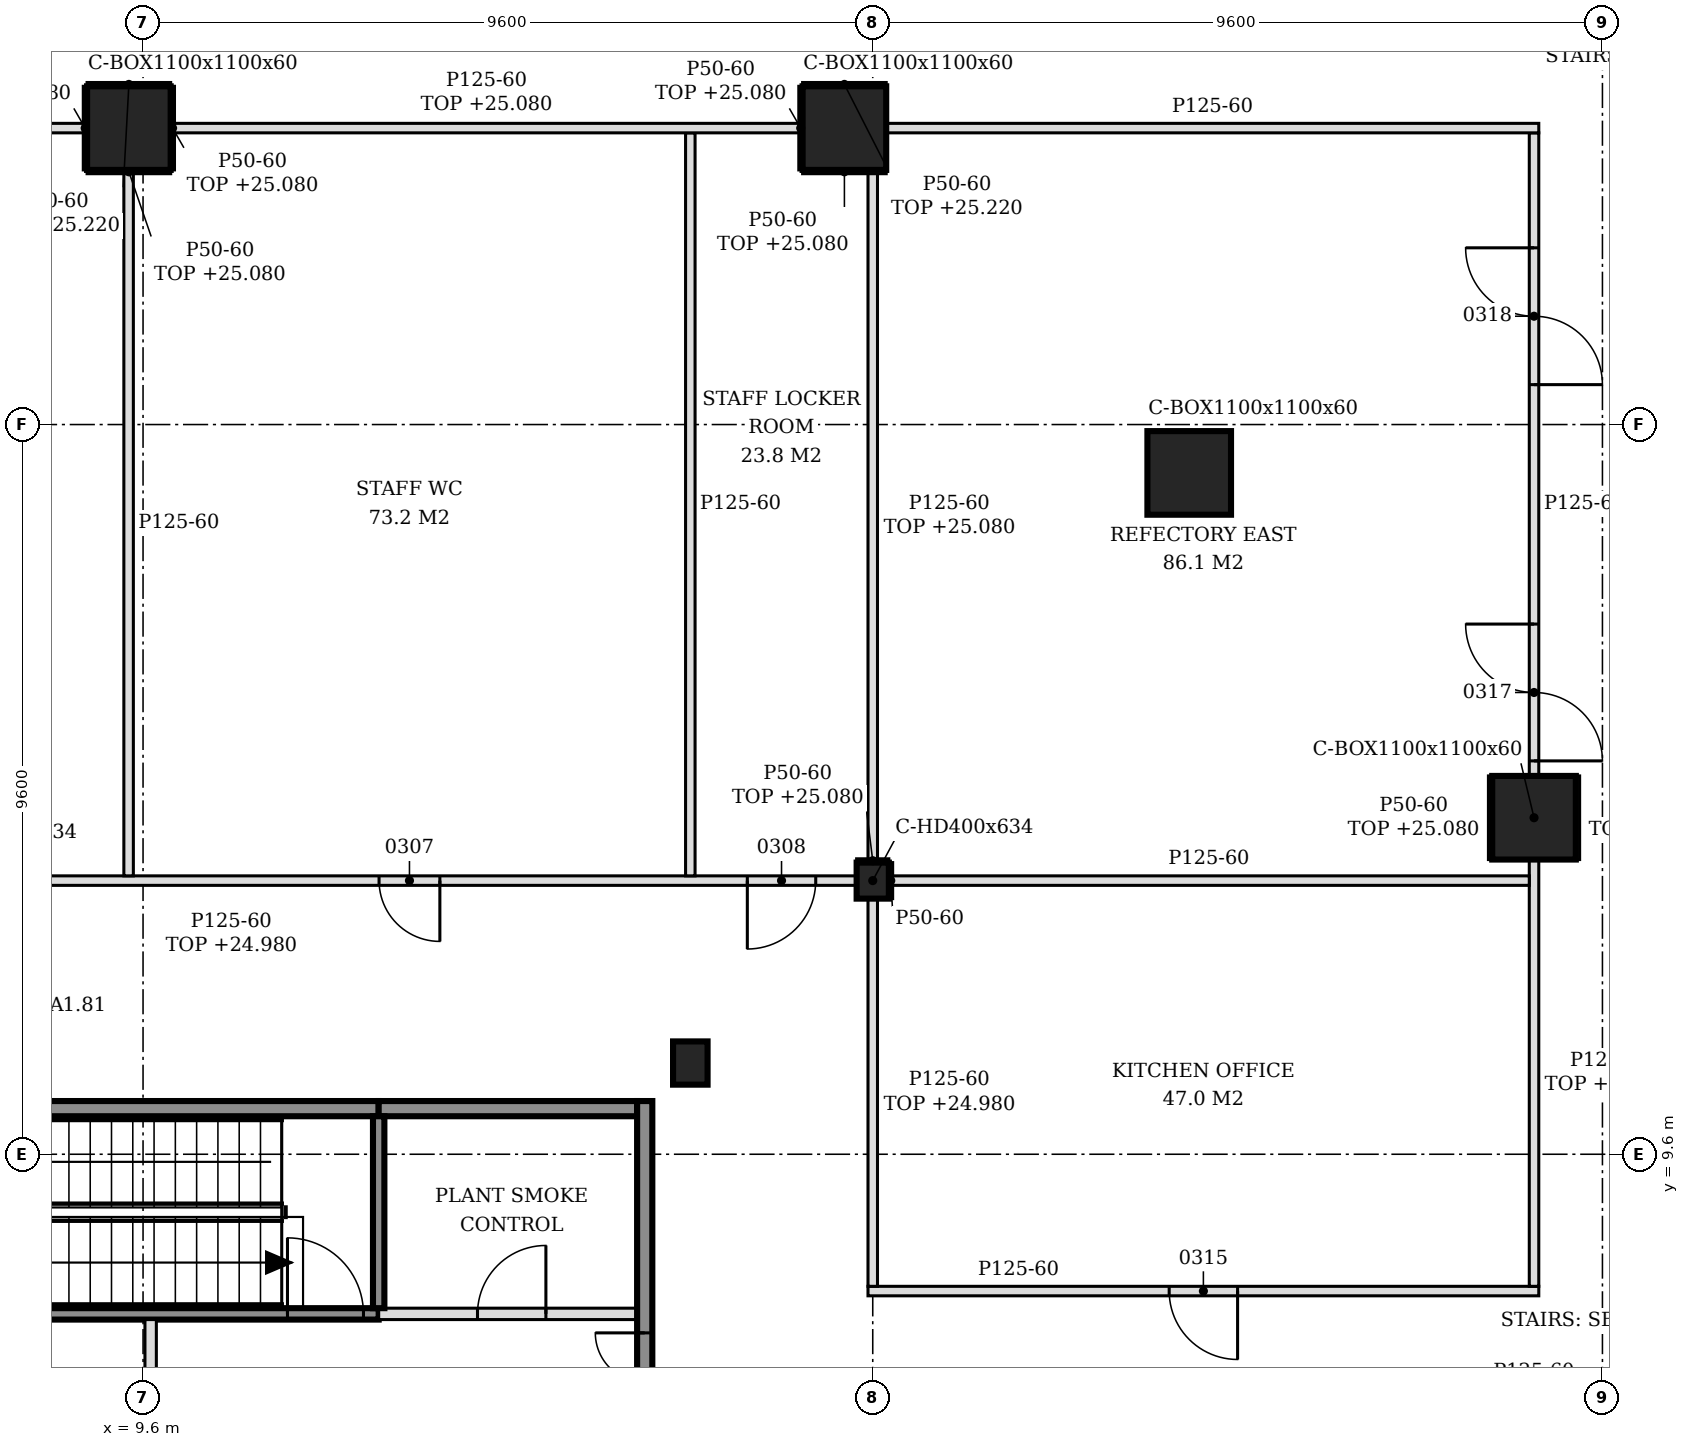
"""IFC4 building model, lengths in metres.
Left out: names, types, materials, properties, quantities, classifications, styles, units other than length and angle.
Written with IfcOpenShell. Run it as: python <this file> out.ifc"""

import sys

from ifc_helpers import new_model, si_unit, direction, frame, frame_2d, origin, origin_2d, place, context, subcontext, project, spatial, polyline, rectangle, hollow_rectangle, i_section, outline, extrude, element, fill, save


model = new_model("IFC4")
c1 = context("Model", 3, precision=1e-05, world=origin(), true_north=direction((0.0, 1.0)))
c2 = subcontext(c1, "Body", "Model", "MODEL_VIEW")
j1 = project(units=[si_unit("LENGTHUNIT", "METRE"), si_unit("PLANEANGLEUNIT", "RADIAN")], contexts=[c1])
p1 = place(None, origin())
s1 = spatial("IfcSite", under=j1, at=p1, CompositionType="ELEMENT")
p2 = place(p1, origin())
s2 = spatial("IfcBuilding", under=s1, at=p2, CompositionType="ELEMENT")
p3 = place(p2, frame((0.0, 0.0, 21.0)))
s3 = spatial("IfcBuildingStorey", under=s2, at=p3, CompositionType="ELEMENT", Elevation=21.0)
for number, where, z_axis, x_axis in (
    (1, (27.9, 14.027, -0.2), (0.0, 0.0, 1.0), (1.0, 0.0, 0.0)),
    (2, (23.364, 18.564, -0.2), (0.0, 0.0, 1.0), (1.0, 0.0, 0.0)),
    (3, (18.827, 23.1, -0.2), (0.0, 0.0, 1.0), (1.0, 0.0, 0.0)),
    (4, (9.414, 23.1, -0.2), (0.0, 0.0, 1.0), (1.0, 0.0, 0.0)),
):
    element("IfcColumn", number, at=place(p3, frame(where, z_axis=z_axis, x_axis=x_axis)), inside=s3, PredefinedType="COLUMN", context=c2, shape_type="SweptSolid", body=[
        extrude(hollow_rectangle(XDim=1.1, YDim=1.1, WallThickness=0.06, at=origin_2d()), origin(), (0.0, 0.0, 1.0), 4.8),
    ])
p4 = place(p3, frame((19.2, 13.2, -0.2), z_axis=(0.0, 0.0, 1.0), x_axis=(1.0, 0.0, 0.0)))
e5 = element("IfcColumn", 5, at=p4, inside=s3, PredefinedType="COLUMN", context=c2, shape_type="SweptSolid", body=[
    extrude(i_section(OverallWidth=0.424, OverallDepth=0.474, WebThickness=0.048, FlangeThickness=0.077, FilletRadius=0.015, at=origin_2d()), origin(), (0.0, 0.0, 1.0), 4.8),
])
p5 = place(p3, frame((16.8, 10.8, -0.2), z_axis=(0.0, 0.0, 1.0), x_axis=(1.0, 0.0, 0.0)))
e6 = element("IfcColumn", 6, at=p5, inside=s3, PredefinedType="COLUMN", context=c2, shape_type="SweptSolid", body=[
    extrude(i_section(OverallWidth=0.454, OverallDepth=0.569, WebThickness=0.078, FlangeThickness=0.125, FilletRadius=0.015, at=origin_2d()), origin(), (0.0, 0.0, 1.0), 4.8),
])
p6 = place(p3, frame((6.275, 7.5, 0.0), z_axis=(0.0, 0.0, 1.0), x_axis=(1.0, 0.0, 0.0)))
e7 = element("IfcWall", 7, at=p6, inside=s3, PredefinedType="SOLIDWALL", context=c2, shape_type="SweptSolid", body=[
    extrude(rectangle(XDim=6.425, YDim=0.15, at=frame_2d((3.212, 0.0))), origin(), (0.0, 0.0, 1.0), 4.6),
])
p7 = place(p6, frame((5.225, 0.0, 0.0)))
e8 = element("IfcOpeningElement", 8, at=p7, cuts=e7, PredefinedType="OPENING", context=c2, shape_type="SweptSolid", body=[
    extrude(rectangle(XDim=1.0, YDim=2.1, at=frame_2d((0.5, 1.05))), frame((0.0, 0.085, 0.0), z_axis=(0.0, -1.0, 0.0), x_axis=(1.0, 0.0, 0.0)), (0.0, 0.0, 1.0), 0.17),
])
p8 = place(p3, frame((12.7, 7.5, 0.0), z_axis=(0.0, 0.0, 1.0), x_axis=(1.0, 0.0, 0.0)))
e9 = element("IfcWall", 9, at=p8, inside=s3, PredefinedType="SOLIDWALL", context=c2, shape_type="SweptSolid", body=[
    extrude(rectangle(XDim=3.4, YDim=0.15, at=frame_2d((1.7, 0.0))), origin(), (0.0, 0.0, 1.0), 4.6),
])
p9 = place(p8, frame((1.3, 0.0, 0.0)))
e10 = element("IfcOpeningElement", 10, at=p9, cuts=e9, PredefinedType="OPENING", context=c2, shape_type="SweptSolid", body=[
    extrude(rectangle(XDim=0.9, YDim=2.1, at=frame_2d((0.45, 1.05))), frame((0.0, 0.085, 0.0), z_axis=(0.0, -1.0, 0.0), x_axis=(1.0, 0.0, 0.0)), (0.0, 0.0, 1.0), 0.17),
])
p10 = place(p3, frame((6.2, 10.2, 0.0), z_axis=(0.0, 0.0, 1.0), x_axis=(1.0, 0.0, 0.0)))
e11 = element("IfcWall", 11, at=p10, inside=s3, PredefinedType="SOLIDWALL", context=c2, shape_type="SweptSolid", body=[
    extrude(rectangle(XDim=6.5, YDim=0.2, at=frame_2d((3.25, 0.0))), origin(), (0.0, 0.0, 1.0), 4.6),
])
p11 = place(p3, frame((12.7, 10.2, 0.0), z_axis=(0.0, 0.0, 1.0), x_axis=(1.0, 0.0, 0.0)))
e12 = element("IfcWall", 12, at=p11, inside=s3, PredefinedType="SOLIDWALL", context=c2, shape_type="SweptSolid", body=[
    extrude(rectangle(XDim=3.4, YDim=0.2, at=frame_2d((1.7, 0.0))), origin(), (0.0, 0.0, 1.0), 4.6),
])
p12 = place(p3, frame((9.7, 4.975, 0.0), z_axis=(0.0, 0.0, 1.0), x_axis=(0.0, 1.0, 0.0)))
e13 = element("IfcWall", 13, at=p12, inside=s3, PredefinedType="SOLIDWALL", context=c2, shape_type="SweptSolid", body=[
    extrude(rectangle(XDim=2.45, YDim=0.15, at=frame_2d((1.225, 0.0))), origin(), (0.0, 0.0, 1.0), 4.6),
])
p13 = place(p3, frame((12.7, 7.575, 0.0), z_axis=(0.0, 0.0, 1.0), x_axis=(0.0, 1.0, 0.0)))
e14 = element("IfcWall", 14, at=p13, inside=s3, PredefinedType="SOLIDWALL", context=c2, shape_type="SweptSolid", body=[
    extrude(rectangle(XDim=2.525, YDim=0.15, at=frame_2d((1.263, 0.0))), origin(), (0.0, 0.0, 1.0), 4.6),
])
p14 = place(p3, frame((16.2, -5.5, 0.0), z_axis=(0.0, 0.0, 1.0), x_axis=(0.0, 1.0, 0.0)))
e15 = element("IfcWall", 15, at=p14, inside=s3, PredefinedType="SOLIDWALL", context=c2, shape_type="SweptSolid", body=[
    extrude(rectangle(XDim=15.8, YDim=0.2, at=frame_2d((7.9, 0.0))), origin(), (0.0, 0.0, 1.0), 4.6),
])
p15 = place(p14, frame((3.05, 0.0, 0.0)))
e16 = element("IfcOpeningElement", 16, at=p15, cuts=e15, PredefinedType="OPENING", context=c2, shape_type="SweptSolid", body=[
    extrude(rectangle(XDim=1.3, YDim=2.1, at=frame_2d((0.65, 1.05))), frame((0.0, 0.11, 0.0), z_axis=(0.0, -1.0, 0.0), x_axis=(1.0, 0.0, 0.0)), (0.0, 0.0, 1.0), 0.22),
])
p16 = place(p14, frame((11.45, 0.0, 0.0)))
e17 = element("IfcOpeningElement", 17, at=p16, cuts=e15, PredefinedType="OPENING", context=c2, shape_type="SweptSolid", body=[
    extrude(rectangle(XDim=1.3, YDim=2.1, at=frame_2d((0.65, 1.05))), frame((0.0, 0.11, 0.0), z_axis=(0.0, -1.0, 0.0), x_axis=(1.0, 0.0, 0.0)), (0.0, 0.0, 1.0), 0.22),
])
p17 = place(p3, frame((19.137, 7.8, 0.0), z_axis=(0.0, 0.0, 1.0), x_axis=(1.0, 0.0, 0.0)))
e18 = element("IfcWall", 18, at=p17, inside=s3, PredefinedType="PARTITIONING", context=c2, shape_type="SweptSolid", body=[
    extrude(outline(polyline([(0.0, 0.0), (8.825, 0.0), (8.825, 4.08), (8.613, 4.08), (8.611, 4.6), (4.962, 4.6), (4.96, 4.08), (4.762, 4.08), (4.76, 4.6), (0.212, 4.6), (0.21, 3.98), (0.0, 3.98), (0.0, 0.0)])), frame((0.0, 0.062, 0.0), z_axis=(0.0, -1.0, 0.0), x_axis=(1.0, 0.0, 0.0)), (0.0, 0.0, 1.0), 0.125),
])
p18 = place(p17, frame((3.962, 0.0, 0.0)))
e19 = element("IfcOpeningElement", 19, at=p18, cuts=e18, PredefinedType="OPENING", context=c2, shape_type="SweptSolid", body=[
    extrude(rectangle(XDim=0.9, YDim=2.1, at=frame_2d((0.45, 1.05))), frame((0.0, 0.073, 0.0), z_axis=(0.0, -1.0, 0.0), x_axis=(1.0, 0.0, 0.0)), (0.0, 0.0, 1.0), 0.145),
])
p19 = place(p3, frame((19.2, 7.863, 0.0), z_axis=(0.0, 0.0, 1.0), x_axis=(0.0, 1.0, 0.0)))
e20 = element("IfcWall", 20, at=p19, inside=s3, PredefinedType="PARTITIONING", context=c2, shape_type="SweptSolid", body=[
    extrude(rectangle(XDim=5.1, YDim=0.125, at=frame_2d((2.55, 0.0))), origin(), (0.0, 0.0, 1.0), 3.98),
])
p20 = place(p3, frame((27.9, 7.863, 0.0), z_axis=(0.0, 0.0, 1.0), x_axis=(0.0, 1.0, 0.0)))
e21 = element("IfcWall", 21, at=p20, inside=s3, PredefinedType="PARTITIONING", context=c2, shape_type="SweptSolid", body=[
    extrude(rectangle(XDim=5.615, YDim=0.125, at=frame_2d((2.807, 0.0))), origin(), (0.0, 0.0, 1.0), 4.08),
])
p21 = place(p3, frame((7.412, 13.2, 0.0), z_axis=(0.0, 0.0, 1.0), x_axis=(1.0, 0.0, 0.0)))
e22 = element("IfcWall", 22, at=p21, inside=s3, PredefinedType="PARTITIONING", context=c2, shape_type="SweptSolid", body=[
    extrude(rectangle(XDim=11.576, YDim=0.125, at=frame_2d((5.788, 0.0))), origin(), (0.0, 0.0, 1.0), 3.98),
])
p22 = place(p21, frame((5.293, 0.0, 0.0)))
e23 = element("IfcOpeningElement", 23, at=p22, cuts=e22, PredefinedType="OPENING", context=c2, shape_type="SweptSolid", body=[
    extrude(rectangle(XDim=0.8, YDim=2.1, at=frame_2d((0.4, 1.05))), frame((0.0, 0.073, 0.0), z_axis=(0.0, -1.0, 0.0), x_axis=(1.0, 0.0, 0.0)), (0.0, 0.0, 1.0), 0.145),
])
p23 = place(p21, frame((10.138, 0.0, 0.0)))
e24 = element("IfcOpeningElement", 24, at=p23, cuts=e22, PredefinedType="OPENING", context=c2, shape_type="SweptSolid", body=[
    extrude(rectangle(XDim=0.9, YDim=2.1, at=frame_2d((0.45, 1.05))), frame((0.0, 0.073, 0.0), z_axis=(0.0, -1.0, 0.0), x_axis=(1.0, 0.0, 0.0)), (0.0, 0.0, 1.0), 0.145),
])
p24 = place(p3, frame((19.412, 13.2, 0.0), z_axis=(0.0, 0.0, 1.0), x_axis=(1.0, 0.0, 0.0)))
e25 = element("IfcWall", 25, at=p24, inside=s3, PredefinedType="PARTITIONING", context=c2, shape_type="SweptSolid", body=[
    extrude(outline(polyline([(0.0, 0.0), (8.425, 0.0), (8.426, 4.08), (8.338, 4.08), (8.336, 4.6), (4.678, 4.6), (4.676, 4.18), (4.498, 4.18), (4.496, 4.6), (0.0, 4.6), (0.0, 0.0)])), frame((0.0, 0.062, 0.0), z_axis=(0.0, -1.0, 0.0), x_axis=(1.0, 0.0, 0.0)), (0.0, 0.0, 1.0), 0.125),
])
p25 = place(p3, frame((9.41, 13.262, 0.0), z_axis=(0.0, 0.0, 1.0), x_axis=(0.0, 1.0, 0.0)))
e26 = element("IfcWall", 26, at=p25, inside=s3, PredefinedType="PARTITIONING", context=c2, shape_type="SweptSolid", body=[
    extrude(outline(polyline([(0.0, 0.0), (9.288, 0.0), (9.288, 4.6), (0.087, 4.6), (0.085, 3.98), (0.0, 3.98), (0.0, 0.0)])), frame((0.0, 0.062, 0.0), z_axis=(0.0, -1.0, 0.0), x_axis=(1.0, 0.0, 0.0)), (0.0, 0.0, 1.0), 0.125),
])
p26 = place(p3, frame((16.8, 13.262, 0.0), z_axis=(0.0, 0.0, 1.0), x_axis=(0.0, 1.0, 0.0)))
e27 = element("IfcWall", 27, at=p26, inside=s3, PredefinedType="PARTITIONING", context=c2, shape_type="SweptSolid", body=[
    extrude(outline(polyline([(0.0, 0.0), (9.775, 0.0), (9.775, 4.08), (9.688, 4.08), (9.686, 4.6), (0.087, 4.6), (0.085, 3.98), (0.0, 3.98), (0.0, 0.0)])), frame((0.0, 0.062, 0.0), z_axis=(0.0, -1.0, 0.0), x_axis=(1.0, 0.0, 0.0)), (0.0, 0.0, 1.0), 0.125),
])
p27 = place(p3, frame((19.2, 13.437, 0.0), z_axis=(0.0, 0.0, 1.0), x_axis=(0.0, 1.0, 0.0)))
e28 = element("IfcWall", 28, at=p27, inside=s3, PredefinedType="PARTITIONING", context=c2, shape_type="SweptSolid", body=[
    extrude(rectangle(XDim=9.113, YDim=0.125, at=frame_2d((4.557, 0.0))), origin(), (0.0, 0.0, 1.0), 4.08),
])
p28 = place(p3, frame((27.9, 14.577, 0.0), z_axis=(0.0, 0.0, 1.0), x_axis=(0.0, 1.0, 0.0)))
e29 = element("IfcWall", 29, at=p28, inside=s3, PredefinedType="PARTITIONING", context=c2, shape_type="SweptSolid", body=[
    extrude(outline(polyline([(0.0, 0.0), (8.46, 0.0), (8.46, 4.6), (4.713, 4.6), (4.711, 4.18), (4.533, 4.18), (4.531, 4.6), (0.0, 4.6), (0.0, 0.0)])), frame((0.0, 0.062, 0.0), z_axis=(0.0, -1.0, 0.0), x_axis=(1.0, 0.0, 0.0)), (0.0, 0.0, 1.0), 0.125),
])
p29 = place(p28, frame((0.198, 0.0, 0.0)))
e30 = element("IfcOpeningElement", 30, at=p29, cuts=e29, PredefinedType="OPENING", context=c2, shape_type="SweptSolid", body=[
    extrude(rectangle(XDim=1.8, YDim=2.1, at=frame_2d((0.9, 1.05))), frame((0.0, 0.073, 0.0), z_axis=(0.0, -1.0, 0.0), x_axis=(1.0, 0.0, 0.0)), (0.0, 0.0, 1.0), 0.145),
])
p30 = place(p28, frame((5.148, 0.0, 0.0)))
e31 = element("IfcOpeningElement", 31, at=p30, cuts=e29, PredefinedType="OPENING", context=c2, shape_type="SweptSolid", body=[
    extrude(rectangle(XDim=1.8, YDim=2.1, at=frame_2d((0.9, 1.05))), frame((0.0, 0.073, 0.0), z_axis=(0.0, -1.0, 0.0), x_axis=(1.0, 0.0, 0.0)), (0.0, 0.0, 1.0), 0.145),
])
for number, where, z_axis, x_axis in (
    (32, (0.55, 23.1, 0.0), (0.0, 0.0, 1.0), (1.0, 0.0, 0.0)),
    (33, (9.964, 23.1, 0.0), (0.0, 0.0, 1.0), (1.0, 0.0, 0.0)),
):
    element("IfcWall", number, at=place(p3, frame(where, z_axis=z_axis, x_axis=x_axis)), inside=s3, PredefinedType="PARTITIONING", context=c2, shape_type="SweptSolid", body=[
        extrude(rectangle(XDim=8.313, YDim=0.125, at=frame_2d((4.157, 0.0))), origin(), (0.0, 0.0, 1.0), 4.08),
    ])
p31 = place(p3, frame((19.377, 23.1, 0.0), z_axis=(0.0, 0.0, 1.0), x_axis=(1.0, 0.0, 0.0)))
e34 = element("IfcWall", 34, at=p31, inside=s3, PredefinedType="PARTITIONING", context=c2, shape_type="SweptSolid", body=[
    extrude(rectangle(XDim=8.585, YDim=0.125, at=frame_2d((4.292, 0.0))), origin(), (0.0, 0.0, 1.0), 4.6),
])
p32 = place(p3, frame((19.437, 12.963, 0.0), z_axis=(0.0, 0.0, 1.0), x_axis=(0.0, 1.0, 0.0)))
e35 = element("IfcWall", 35, at=p32, inside=s3, PredefinedType="PARTITIONING", context=c2, shape_type="SweptSolid", body=[
    extrude(rectangle(XDim=0.474, YDim=0.05, at=frame_2d((0.237, 0.0))), origin(), (0.0, 0.0, 1.0), 4.6),
])
for number, where, z_axis, x_axis in (
    (36, (27.325, 13.477, 0.0), (0.0, 0.0, 1.0), (0.0, 1.0, 0.0)),
    (37, (28.475, 13.477, 0.0), (0.0, 0.0, 1.0), (0.0, 1.0, 0.0)),
):
    element("IfcWall", number, at=place(p3, frame(where, z_axis=z_axis, x_axis=x_axis)), inside=s3, PredefinedType="PARTITIONING", context=c2, shape_type="SweptSolid", body=[
        extrude(rectangle(XDim=1.1, YDim=0.05, at=frame_2d((0.55, 0.0))), origin(), (0.0, 0.0, 1.0), 4.08),
    ])
p33 = place(p3, frame((18.988, 13.462, 0.0), z_axis=(0.0, 0.0, 1.0), x_axis=(1.0, 0.0, 0.0)))
e38 = element("IfcWall", 38, at=p33, inside=s3, PredefinedType="PARTITIONING", context=c2, shape_type="SweptSolid", body=[
    extrude(rectangle(XDim=0.424, YDim=0.05, at=frame_2d((0.212, 0.0))), origin(), (0.0, 0.0, 1.0), 4.08),
])
for number, where, z_axis, x_axis in (
    (39, (9.989, 22.55, 0.0), (0.0, 0.0, 1.0), (0.0, 1.0, 0.0)),
    (40, (8.839, 22.55, 0.0), (0.0, 0.0, 1.0), (0.0, 1.0, 0.0)),
    (41, (18.252, 22.55, 0.0), (0.0, 0.0, 1.0), (0.0, 1.0, 0.0)),
):
    element("IfcWall", number, at=place(p3, frame(where, z_axis=z_axis, x_axis=x_axis)), inside=s3, PredefinedType="PARTITIONING", context=c2, shape_type="SweptSolid", body=[
        extrude(rectangle(XDim=1.1, YDim=0.05, at=frame_2d((0.55, 0.0))), origin(), (0.0, 0.0, 1.0), 4.08),
    ])
p34 = place(p3, frame((8.864, 23.675, 0.0), z_axis=(0.0, 0.0, 1.0), x_axis=(1.0, 0.0, 0.0)))
e42 = element("IfcWall", 42, at=p34, inside=s3, PredefinedType="PARTITIONING", context=c2, shape_type="SweptSolid", body=[
    extrude(rectangle(XDim=1.1, YDim=0.05, at=frame_2d((0.55, 0.0))), origin(), (0.0, 0.0, 1.0), 4.22),
])
for number, where, z_axis, x_axis in (
    (43, (8.864, 22.525, 0.0), (0.0, 0.0, 1.0), (1.0, 0.0, 0.0)),
    (44, (18.277, 22.525, 0.0), (0.0, 0.0, 1.0), (1.0, 0.0, 0.0)),
):
    element("IfcWall", number, at=place(p3, frame(where, z_axis=z_axis, x_axis=x_axis)), inside=s3, PredefinedType="PARTITIONING", context=c2, shape_type="SweptSolid", body=[
        extrude(rectangle(XDim=1.1, YDim=0.05, at=frame_2d((0.55, 0.0))), origin(), (0.0, 0.0, 1.0), 4.08),
    ])
p35 = place(p3, frame((18.277, 23.675, 0.0), z_axis=(0.0, 0.0, 1.0), x_axis=(1.0, 0.0, 0.0)))
e45 = element("IfcWall", 45, at=p35, inside=s3, PredefinedType="PARTITIONING", context=c2, shape_type="SweptSolid", body=[
    extrude(rectangle(XDim=1.1, YDim=0.05, at=frame_2d((0.55, 0.0))), origin(), (0.0, 0.0, 1.0), 4.22),
])
p36 = place(p7, origin())
e46 = element("IfcDoor", 46, at=p36, inside=s3, OperationType="SINGLE_SWING_LEFT", PredefinedType="DOOR", context=c2, shape_type="SweptSolid", body=[
    extrude(rectangle(XDim=1.0, YDim=2.1, at=frame_2d((0.5, 1.05))), frame((0.0, 0.025, 0.0), z_axis=(0.0, -1.0, 0.0), x_axis=(1.0, 0.0, 0.0)), (0.0, 0.0, 1.0), 0.05),
])
fill(e8, e46)
p37 = place(p16, origin())
e47 = element("IfcDoor", 47, at=p37, inside=s3, OperationType="DOUBLE_DOOR_SINGLE_SWING", PredefinedType="DOOR", context=c2, shape_type="SweptSolid", body=[
    extrude(rectangle(XDim=1.3, YDim=2.1, at=frame_2d((0.65, 1.05))), frame((0.0, 0.025, 0.0), z_axis=(0.0, -1.0, 0.0), x_axis=(1.0, 0.0, 0.0)), (0.0, 0.0, 1.0), 0.05),
])
fill(e17, e47)
p38 = place(p9, origin())
e48 = element("IfcDoor", 48, at=p38, inside=s3, OperationType="SINGLE_SWING_RIGHT", PredefinedType="DOOR", context=c2, shape_type="SweptSolid", body=[
    extrude(rectangle(XDim=0.9, YDim=2.1, at=frame_2d((0.45, 1.05))), frame((0.0, 0.025, 0.0), z_axis=(0.0, -1.0, 0.0), x_axis=(1.0, 0.0, 0.0)), (0.0, 0.0, 1.0), 0.05),
])
fill(e10, e48)
p39 = place(p22, frame((0.8, 0.0, 0.0), z_axis=(0.0, 0.0, 1.0), x_axis=(-1.0, 0.0, 0.0)))
e49 = element("IfcDoor", 49, at=p39, inside=s3, OperationType="SINGLE_SWING_LEFT", PredefinedType="DOOR", context=c2, shape_type="SweptSolid", body=[
    extrude(rectangle(XDim=0.8, YDim=2.1, at=frame_2d((0.4, 1.05))), frame((0.0, 0.025, 0.0), z_axis=(0.0, -1.0, 0.0), x_axis=(1.0, 0.0, 0.0)), (0.0, 0.0, 1.0), 0.05),
])
fill(e23, e49)
p40 = place(p23, frame((0.9, 0.0, 0.0), z_axis=(0.0, 0.0, 1.0), x_axis=(-1.0, 0.0, 0.0)))
e50 = element("IfcDoor", 50, at=p40, inside=s3, OperationType="SINGLE_SWING_RIGHT", PredefinedType="DOOR", context=c2, shape_type="SweptSolid", body=[
    extrude(rectangle(XDim=0.9, YDim=2.1, at=frame_2d((0.45, 1.05))), frame((0.0, 0.025, 0.0), z_axis=(0.0, -1.0, 0.0), x_axis=(1.0, 0.0, 0.0)), (0.0, 0.0, 1.0), 0.05),
])
fill(e24, e50)
p41 = place(p18, frame((0.9, 0.0, 0.0), z_axis=(0.0, 0.0, 1.0), x_axis=(-1.0, 0.0, 0.0)))
e51 = element("IfcDoor", 51, at=p41, inside=s3, OperationType="SINGLE_SWING_LEFT", PredefinedType="DOOR", context=c2, shape_type="SweptSolid", body=[
    extrude(rectangle(XDim=0.9, YDim=2.1, at=frame_2d((0.45, 1.05))), frame((0.0, 0.025, 0.0), z_axis=(0.0, -1.0, 0.0), x_axis=(1.0, 0.0, 0.0)), (0.0, 0.0, 1.0), 0.05),
])
fill(e19, e51)
p42 = place(p29, frame((1.8, 0.0, 0.0), z_axis=(0.0, 0.0, 1.0), x_axis=(-1.0, 0.0, 0.0)))
e52 = element("IfcDoor", 52, at=p42, inside=s3, OperationType="DOUBLE_DOOR_SINGLE_SWING", PredefinedType="DOOR", context=c2, shape_type="SweptSolid", body=[
    extrude(rectangle(XDim=1.8, YDim=2.1, at=frame_2d((0.9, 1.05))), frame((0.0, 0.025, 0.0), z_axis=(0.0, -1.0, 0.0), x_axis=(1.0, 0.0, 0.0)), (0.0, 0.0, 1.0), 0.05),
])
fill(e30, e52)
p43 = place(p30, frame((1.8, 0.0, 0.0), z_axis=(0.0, 0.0, 1.0), x_axis=(-1.0, 0.0, 0.0)))
e53 = element("IfcDoor", 53, at=p43, inside=s3, OperationType="DOUBLE_DOOR_SINGLE_SWING", PredefinedType="DOOR", context=c2, shape_type="SweptSolid", body=[
    extrude(rectangle(XDim=1.8, YDim=2.1, at=frame_2d((0.9, 1.05))), frame((0.0, 0.025, 0.0), z_axis=(0.0, -1.0, 0.0), x_axis=(1.0, 0.0, 0.0)), (0.0, 0.0, 1.0), 0.05),
])
fill(e31, e53)
save(model, sys.argv[1])
